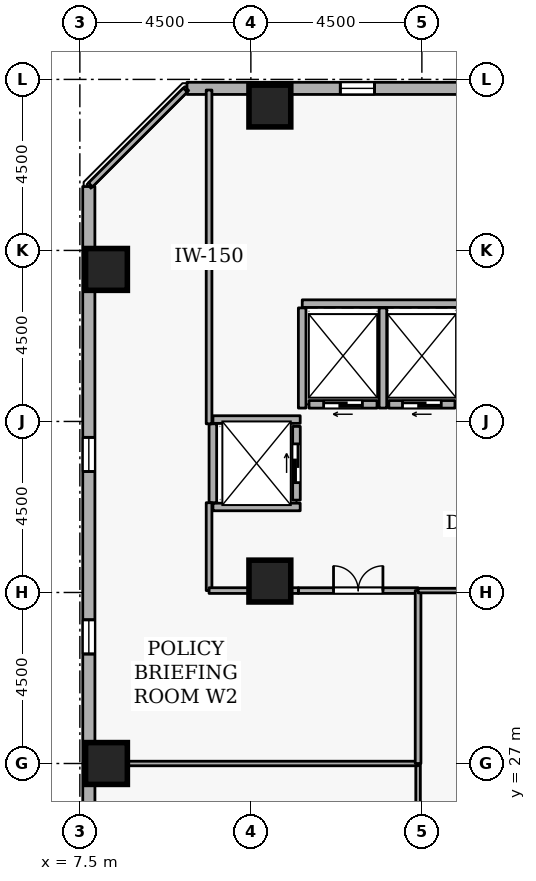
"""IFC4 building model, lengths in metres.
Left out: names, types, materials, properties, quantities, classifications, styles, units other than length and angle.
Written with IfcOpenShell. Run it as: python <this file> out.ifc"""

import sys

from ifc_helpers import new_model, si_unit, direction, frame, frame_2d, origin, origin_2d, place, context, subcontext, project, spatial, rectangle, extrude, element, fill, save


model = new_model("IFC4")
c1 = context("Model", 3, precision=1e-05, world=origin(), true_north=direction((0.0, 1.0)))
c2 = subcontext(c1, "Body", "Model", "MODEL_VIEW")
j1 = project(units=[si_unit("LENGTHUNIT", "METRE"), si_unit("PLANEANGLEUNIT", "RADIAN")], contexts=[c1])
p1 = place(None, origin())
s1 = spatial("IfcSite", under=j1, at=p1, CompositionType="ELEMENT")
p2 = place(p1, origin())
s2 = spatial("IfcBuilding", under=s1, at=p2, CompositionType="ELEMENT")
p3 = place(p2, frame((0.0, 0.0, 159.9)))
s3 = spatial("IfcBuildingStorey", under=s2, at=p3, CompositionType="ELEMENT", Elevation=159.9)
for number, where, z_axis, x_axis in (
    (1, (12.5, 44.3, 0.0), (0.0, 0.0, 1.0), (1.0, 0.0, 0.0)),
    (2, (8.2, 27.0, 0.0), (0.0, 0.0, 1.0), (1.0, 0.0, 0.0)),
    (3, (8.2, 40.0, 0.0), (0.0, 0.0, 1.0), (1.0, 0.0, 0.0)),
    (4, (12.5, 31.8, 0.0), (0.0, 0.0, 1.0), (1.0, 0.0, 0.0)),
):
    element("IfcColumn", number, at=place(p3, frame(where, z_axis=z_axis, x_axis=x_axis)), inside=s3, PredefinedType="COLUMN", context=c2, shape_type="SweptSolid", body=[
        extrude(rectangle(XDim=1.1, YDim=1.1, at=origin_2d()), origin(), (0.0, 0.0, 1.0), 3.6),
    ])
p4 = place(p3, frame((45.854, 44.762, 0.0), z_axis=(0.0, 0.0, 1.0), x_axis=(-0.999999997144, 7.5574884e-05, 0.0)))
e5 = element("IfcWall", 5, at=p4, inside=s3, PredefinedType="STANDARD", context=c2, shape_type="SweptSolid", body=[
    extrude(rectangle(XDim=35.535, YDim=0.32, at=frame_2d((17.768, 0.0))), origin(), (0.0, 0.0, 1.0), 2.7),
])
p5 = place(p4, frame((1.8, 0.0, 0.72)))
e6 = element("IfcOpeningElement", 6, at=p5, cuts=e5, PredefinedType="OPENING", context=c2, shape_type="SweptSolid", body=[
    extrude(rectangle(XDim=0.9, YDim=1.75, at=frame_2d((0.45, 0.875))), frame((0.0, 0.17, 0.0), z_axis=(0.0, -1.0, 0.0), x_axis=(1.0, 0.0, 0.0)), (0.0, 0.0, 1.0), 0.34),
])
p6 = place(p4, frame((11.4, 0.0, 0.72)))
e7 = element("IfcOpeningElement", 7, at=p6, cuts=e5, PredefinedType="OPENING", context=c2, shape_type="SweptSolid", body=[
    extrude(rectangle(XDim=0.9, YDim=1.75, at=frame_2d((0.45, 0.875))), frame((0.0, 0.17, 0.0), z_axis=(0.0, -1.0, 0.0), x_axis=(1.0, 0.0, 0.0)), (0.0, 0.0, 1.0), 0.34),
])
p7 = place(p4, frame((16.2, 0.0, 0.72)))
e8 = element("IfcOpeningElement", 8, at=p7, cuts=e5, PredefinedType="OPENING", context=c2, shape_type="SweptSolid", body=[
    extrude(rectangle(XDim=0.9, YDim=1.75, at=frame_2d((0.45, 0.875))), frame((0.0, 0.17, 0.0), z_axis=(0.0, -1.0, 0.0), x_axis=(1.0, 0.0, 0.0)), (0.0, 0.0, 1.0), 0.34),
])
p8 = place(p4, frame((25.8, 0.0, 0.72)))
e9 = element("IfcOpeningElement", 9, at=p8, cuts=e5, PredefinedType="OPENING", context=c2, shape_type="SweptSolid", body=[
    extrude(rectangle(XDim=0.9, YDim=1.75, at=frame_2d((0.45, 0.875))), frame((0.0, 0.17, 0.0), z_axis=(0.0, -1.0, 0.0), x_axis=(1.0, 0.0, 0.0)), (0.0, 0.0, 1.0), 0.34),
])
p9 = place(p4, frame((30.6, 0.0, 0.72)))
e10 = element("IfcOpeningElement", 10, at=p9, cuts=e5, PredefinedType="OPENING", context=c2, shape_type="SweptSolid", body=[
    extrude(rectangle(XDim=0.9, YDim=1.75, at=frame_2d((0.45, 0.875))), frame((0.0, 0.17, 0.0), z_axis=(0.0, -1.0, 0.0), x_axis=(1.0, 0.0, 0.0)), (0.0, 0.0, 1.0), 0.34),
])
p10 = place(p3, frame((7.735, 42.181, 0.0), z_axis=(0.0, 0.0, 1.0), x_axis=(7.5574884e-05, -0.999999997144, 0.0)))
e11 = element("IfcWall", 11, at=p10, inside=s3, PredefinedType="STANDARD", context=c2, shape_type="SweptSolid", body=[
    extrude(rectangle(XDim=35.535, YDim=0.32, at=frame_2d((17.768, 0.0))), origin(), (0.0, 0.0, 1.0), 2.7),
])
p11 = place(p10, frame((6.6, 0.0, 0.72)))
e12 = element("IfcOpeningElement", 12, at=p11, cuts=e11, PredefinedType="OPENING", context=c2, shape_type="SweptSolid", body=[
    extrude(rectangle(XDim=0.9, YDim=1.75, at=frame_2d((0.45, 0.875))), frame((0.0, 0.17, 0.0), z_axis=(0.0, -1.0, 0.0), x_axis=(1.0, 0.0, 0.0)), (0.0, 0.0, 1.0), 0.34),
])
p12 = place(p10, frame((11.4, 0.0, 0.72)))
e13 = element("IfcOpeningElement", 13, at=p12, cuts=e11, PredefinedType="OPENING", context=c2, shape_type="SweptSolid", body=[
    extrude(rectangle(XDim=0.9, YDim=1.75, at=frame_2d((0.45, 0.875))), frame((0.0, 0.17, 0.0), z_axis=(0.0, -1.0, 0.0), x_axis=(1.0, 0.0, 0.0)), (0.0, 0.0, 1.0), 0.34),
])
p13 = place(p10, frame((21.0, 0.0, 0.72)))
e14 = element("IfcOpeningElement", 14, at=p13, cuts=e11, PredefinedType="OPENING", context=c2, shape_type="SweptSolid", body=[
    extrude(rectangle(XDim=0.9, YDim=1.75, at=frame_2d((0.45, 0.875))), frame((0.0, 0.17, 0.0), z_axis=(0.0, -1.0, 0.0), x_axis=(1.0, 0.0, 0.0)), (0.0, 0.0, 1.0), 0.34),
])
p14 = place(p10, frame((25.8, 0.0, 0.72)))
e15 = element("IfcOpeningElement", 15, at=p14, cuts=e11, PredefinedType="OPENING", context=c2, shape_type="SweptSolid", body=[
    extrude(rectangle(XDim=0.9, YDim=1.75, at=frame_2d((0.45, 0.875))), frame((0.0, 0.17, 0.0), z_axis=(0.0, -1.0, 0.0), x_axis=(1.0, 0.0, 0.0)), (0.0, 0.0, 1.0), 0.34),
])
p15 = place(p10, frame((30.6, 0.0, 0.72)))
e16 = element("IfcOpeningElement", 16, at=p15, cuts=e11, PredefinedType="OPENING", context=c2, shape_type="SweptSolid", body=[
    extrude(rectangle(XDim=0.9, YDim=1.75, at=frame_2d((0.45, 0.875))), frame((0.0, 0.17, 0.0), z_axis=(0.0, -1.0, 0.0), x_axis=(1.0, 0.0, 0.0)), (0.0, 0.0, 1.0), 0.34),
])
p16 = place(p3, frame((17.37, 36.45, 0.0), z_axis=(0.0, 0.0, 1.0), x_axis=(-1.0, 0.0, 0.0)))
e17 = element("IfcWall", 17, at=p16, inside=s3, PredefinedType="STANDARD", context=c2, shape_type="SweptSolid", body=[
    extrude(rectangle(XDim=1.74, YDim=0.2, at=frame_2d((0.87, 0.0))), origin(), (0.0, 0.0, 1.0), 3.34),
])
p17 = place(p16, frame((0.36, 0.0, 0.0)))
e18 = element("IfcOpeningElement", 18, at=p17, cuts=e17, PredefinedType="OPENING", context=c2, shape_type="SweptSolid", body=[
    extrude(rectangle(XDim=1.02, YDim=2.06, at=frame_2d((0.51, 1.03))), frame((0.0, 0.11, 0.0), z_axis=(0.0, -1.0, 0.0), x_axis=(1.0, 0.0, 0.0)), (0.0, 0.0, 1.0), 0.22),
])
p18 = place(p3, frame((15.32, 36.45, 0.0), z_axis=(0.0, 0.0, 1.0), x_axis=(-1.0, 0.0, 0.0)))
e19 = element("IfcWall", 19, at=p18, inside=s3, PredefinedType="STANDARD", context=c2, shape_type="SweptSolid", body=[
    extrude(rectangle(XDim=1.79, YDim=0.2, at=frame_2d((0.895, 0.0))), origin(), (0.0, 0.0, 1.0), 3.34),
])
p19 = place(p18, frame((0.385, 0.0, 0.0)))
e20 = element("IfcOpeningElement", 20, at=p19, cuts=e19, PredefinedType="OPENING", context=c2, shape_type="SweptSolid", body=[
    extrude(rectangle(XDim=1.02, YDim=2.06, at=frame_2d((0.51, 1.03))), frame((0.0, 0.11, 0.0), z_axis=(0.0, -1.0, 0.0), x_axis=(1.0, 0.0, 0.0)), (0.0, 0.0, 1.0), 0.22),
])
p20 = place(p3, frame((13.2, 33.93, 0.0), z_axis=(0.0, 0.0, 1.0), x_axis=(0.0, 1.0, 0.0)))
e21 = element("IfcWall", 21, at=p20, inside=s3, PredefinedType="STANDARD", context=c2, shape_type="SweptSolid", body=[
    extrude(rectangle(XDim=1.94, YDim=0.2, at=frame_2d((0.97, 0.0))), origin(), (0.0, 0.0, 1.0), 3.34),
])
p21 = place(p20, frame((0.46, 0.0, 0.0)))
e22 = element("IfcOpeningElement", 22, at=p21, cuts=e21, PredefinedType="OPENING", context=c2, shape_type="SweptSolid", body=[
    extrude(rectangle(XDim=1.02, YDim=2.06, at=frame_2d((0.51, 1.03))), frame((0.0, 0.11, 0.0), z_axis=(0.0, -1.0, 0.0), x_axis=(1.0, 0.0, 0.0)), (0.0, 0.0, 1.0), 0.22),
])
p22 = place(p3, frame((13.352, 39.1, 0.0), z_axis=(0.0, 0.0, 1.0), x_axis=(1.0, 0.0, 0.0)))
e23 = element("IfcWall", 23, at=p22, inside=s3, PredefinedType="STANDARD", context=c2, shape_type="SweptSolid", body=[
    extrude(rectangle(XDim=4.196, YDim=0.2, at=frame_2d((2.098, 0.0))), origin(), (0.0, 0.0, 1.0), 3.34),
])
for number, where, z_axis, x_axis in (
    (24, (15.475, 36.352, 0.0), (0.0, 0.0, 1.0), (0.0, 1.0, 0.0)),
    (25, (13.35, 36.352, 0.0), (0.0, 0.0, 1.0), (0.0, 1.0, 0.0)),
):
    element("IfcWall", number, at=place(p3, frame(where, z_axis=z_axis, x_axis=x_axis)), inside=s3, PredefinedType="STANDARD", context=c2, shape_type="SweptSolid", body=[
        extrude(rectangle(XDim=2.636, YDim=0.2, at=frame_2d((1.318, 0.0))), origin(), (0.0, 0.0, 1.0), 3.34),
    ])
for number, where, z_axis, x_axis in (
    (26, (11.002, 36.05, 0.0), (0.0, 0.0, 1.0), (1.0, 0.0, 0.0)),
    (27, (11.002, 33.75, 0.0), (0.0, 0.0, 1.0), (1.0, 0.0, 0.0)),
):
    element("IfcWall", number, at=place(p3, frame(where, z_axis=z_axis, x_axis=x_axis)), inside=s3, PredefinedType="STANDARD", context=c2, shape_type="SweptSolid", body=[
        extrude(rectangle(XDim=2.296, YDim=0.2, at=frame_2d((1.148, 0.0))), origin(), (0.0, 0.0, 1.0), 3.34),
    ])
p23 = place(p3, frame((11.0, 33.862, 0.0), z_axis=(0.0, 0.0, 1.0), x_axis=(0.0, 1.0, 0.0)))
e28 = element("IfcWall", 28, at=p23, inside=s3, PredefinedType="STANDARD", context=c2, shape_type="SweptSolid", body=[
    extrude(rectangle(XDim=2.076, YDim=0.2, at=frame_2d((1.038, 0.0))), origin(), (0.0, 0.0, 1.0), 3.34),
])
p24 = place(p3, frame((16.4, 27.0, 0.0), z_axis=(0.0, 0.0, 1.0), x_axis=(0.0, -1.0, 0.0)))
e29 = element("IfcWall", 29, at=p24, inside=s3, PredefinedType="PARTITIONING", context=c2, shape_type="SweptSolid", body=[
    extrude(rectangle(XDim=4.55, YDim=0.12, at=frame_2d((2.275, 0.0))), origin(), (0.0, 0.0, 1.0), 3.34),
])
p25 = place(p3, frame((7.78, 27.0, 0.0), z_axis=(0.0, 0.0, 1.0), x_axis=(1.0, 0.0, 0.0)))
e30 = element("IfcWall", 30, at=p25, inside=s3, PredefinedType="PARTITIONING", context=c2, shape_type="SweptSolid", body=[
    extrude(rectangle(XDim=8.62, YDim=0.12, at=frame_2d((4.31, 0.0))), origin(), (0.0, 0.0, 1.0), 2.878),
])
p26 = place(p3, frame((13.25, 31.55, 0.0), z_axis=(0.0, 0.0, 1.0), x_axis=(1.0, 0.0, 0.0)))
e31 = element("IfcWall", 31, at=p26, inside=s3, PredefinedType="PARTITIONING", context=c2, shape_type="SweptSolid", body=[
    extrude(rectangle(XDim=3.15, YDim=0.15, at=frame_2d((1.575, 0.0))), origin(), (0.0, 0.0, 1.0), 3.34),
])
p27 = place(p26, frame((0.925, 0.0, 0.0)))
e32 = element("IfcOpeningElement", 32, at=p27, cuts=e31, PredefinedType="OPENING", context=c2, shape_type="SweptSolid", body=[
    extrude(rectangle(XDim=1.3, YDim=2.12, at=frame_2d((0.65, 1.06))), frame((0.0, 0.085, 0.0), z_axis=(0.0, -1.0, 0.0), x_axis=(1.0, 0.0, 0.0)), (0.0, 0.0, 1.0), 0.17),
])
p28 = place(p3, frame((16.4, 31.55, 0.0), z_axis=(0.0, 0.0, 1.0), x_axis=(0.0, -1.0, 0.0)))
e33 = element("IfcWall", 33, at=p28, inside=s3, PredefinedType="PARTITIONING", context=c2, shape_type="SweptSolid", body=[
    extrude(rectangle(XDim=4.55, YDim=0.15, at=frame_2d((2.275, 0.0))), origin(), (0.0, 0.0, 1.0), 3.34),
])
p29 = place(p3, frame((7.78, 42.225, 0.0), z_axis=(0.0, 0.0, 1.0), x_axis=(0.707106781187, 0.707106781187, 0.0)))
e34 = element("IfcWall", 34, at=p29, inside=s3, PredefinedType="PARTITIONING", context=c2, shape_type="SweptSolid", body=[
    extrude(rectangle(XDim=3.528, YDim=0.15, at=frame_2d((1.764, 0.0))), origin(), (0.0, 0.0, 1.0), 3.34),
])
p30 = place(p3, frame((10.9, 44.72, 0.0), z_axis=(0.0, 0.0, 1.0), x_axis=(0.0, -1.0, 0.0)))
e35 = element("IfcWall", 35, at=p30, inside=s3, PredefinedType="PARTITIONING", context=c2, shape_type="SweptSolid", body=[
    extrude(rectangle(XDim=8.782, YDim=0.15, at=frame_2d((4.391, 0.0))), origin(), (0.0, 0.0, 1.0), 3.34),
])
p31 = place(p3, frame((10.9, 33.862, 0.0), z_axis=(0.0, 0.0, 1.0), x_axis=(0.0, -1.0, 0.0)))
e36 = element("IfcWall", 36, at=p31, inside=s3, PredefinedType="PARTITIONING", context=c2, shape_type="SweptSolid", body=[
    extrude(rectangle(XDim=2.312, YDim=0.15, at=frame_2d((1.156, 0.0))), origin(), (0.0, 0.0, 1.0), 3.34),
])
p32 = place(p3, frame((10.9, 31.55, 0.0), z_axis=(0.0, 0.0, 1.0), x_axis=(1.0, 0.0, 0.0)))
e37 = element("IfcWall", 37, at=p32, inside=s3, PredefinedType="PARTITIONING", context=c2, shape_type="SweptSolid", body=[
    extrude(rectangle(XDim=2.35, YDim=0.15, at=frame_2d((1.175, 0.0))), origin(), (0.0, 0.0, 1.0), 3.34),
])
p33 = place(p3, frame((16.4, 31.55, 0.0), z_axis=(0.0, 0.0, 1.0), x_axis=(1.0, 0.0, 0.0)))
e38 = element("IfcWall", 38, at=p33, inside=s3, PredefinedType="PARTITIONING", context=c2, shape_type="SweptSolid", body=[
    extrude(rectangle(XDim=4.5, YDim=0.12, at=frame_2d((2.25, 0.0))), origin(), (0.0, 0.0, 1.0), 3.34),
])
p34 = place(p33, frame((1.775, 0.0, 0.0)))
e39 = element("IfcOpeningElement", 39, at=p34, cuts=e38, PredefinedType="OPENING", context=c2, shape_type="SweptSolid", body=[
    extrude(rectangle(XDim=0.95, YDim=2.1, at=frame_2d((0.475, 1.05))), frame((0.0, 0.07, 0.0), z_axis=(0.0, -1.0, 0.0), x_axis=(1.0, 0.0, 0.0)), (0.0, 0.0, 1.0), 0.14),
])
p35 = place(p9, origin())
e40 = element("IfcWindow", 40, at=p35, inside=s3, PartitioningType="SINGLE_PANEL", PredefinedType="WINDOW", context=c2, shape_type="SweptSolid", body=[
    extrude(rectangle(XDim=0.9, YDim=1.75, at=frame_2d((0.45, 0.875))), frame((0.0, 0.03, 0.0), z_axis=(0.0, -1.0, 0.0), x_axis=(1.0, 0.0, 0.0)), (0.0, 0.0, 1.0), 0.06),
])
fill(e10, e40)
p36 = place(p11, origin())
e41 = element("IfcWindow", 41, at=p36, inside=s3, PartitioningType="SINGLE_PANEL", PredefinedType="WINDOW", context=c2, shape_type="SweptSolid", body=[
    extrude(rectangle(XDim=0.9, YDim=1.75, at=frame_2d((0.45, 0.875))), frame((0.0, 0.03, 0.0), z_axis=(0.0, -1.0, 0.0), x_axis=(1.0, 0.0, 0.0)), (0.0, 0.0, 1.0), 0.06),
])
fill(e12, e41)
p37 = place(p12, origin())
e42 = element("IfcWindow", 42, at=p37, inside=s3, PartitioningType="SINGLE_PANEL", PredefinedType="WINDOW", context=c2, shape_type="SweptSolid", body=[
    extrude(rectangle(XDim=0.9, YDim=1.75, at=frame_2d((0.45, 0.875))), frame((0.0, 0.03, 0.0), z_axis=(0.0, -1.0, 0.0), x_axis=(1.0, 0.0, 0.0)), (0.0, 0.0, 1.0), 0.06),
])
fill(e13, e42)
p38 = place(p17, origin())
e43 = element("IfcDoor", 43, at=p38, inside=s3, OperationType="SLIDING_TO_LEFT", PredefinedType="DOOR", context=c2, shape_type="SweptSolid", body=[
    extrude(rectangle(XDim=1.02, YDim=2.06, at=frame_2d((0.51, 1.03))), frame((0.0, 0.025, 0.0), z_axis=(0.0, -1.0, 0.0), x_axis=(1.0, 0.0, 0.0)), (0.0, 0.0, 1.0), 0.05),
])
fill(e18, e43)
p39 = place(p19, origin())
e44 = element("IfcDoor", 44, at=p39, inside=s3, OperationType="SLIDING_TO_LEFT", PredefinedType="DOOR", context=c2, shape_type="SweptSolid", body=[
    extrude(rectangle(XDim=1.02, YDim=2.06, at=frame_2d((0.51, 1.03))), frame((0.0, 0.025, 0.0), z_axis=(0.0, -1.0, 0.0), x_axis=(1.0, 0.0, 0.0)), (0.0, 0.0, 1.0), 0.05),
])
fill(e20, e44)
p40 = place(p21, origin())
e45 = element("IfcDoor", 45, at=p40, inside=s3, OperationType="SLIDING_TO_LEFT", PredefinedType="DOOR", context=c2, shape_type="SweptSolid", body=[
    extrude(rectangle(XDim=1.02, YDim=2.06, at=frame_2d((0.51, 1.03))), frame((0.0, 0.025, 0.0), z_axis=(0.0, -1.0, 0.0), x_axis=(1.0, 0.0, 0.0)), (0.0, 0.0, 1.0), 0.05),
])
fill(e22, e45)
p41 = place(p27, origin())
e46 = element("IfcDoor", 46, at=p41, inside=s3, OperationType="DOUBLE_DOOR_SINGLE_SWING", PredefinedType="DOOR", context=c2, shape_type="SweptSolid", body=[
    extrude(rectangle(XDim=1.3, YDim=2.12, at=frame_2d((0.65, 1.06))), frame((0.0, 0.025, 0.0), z_axis=(0.0, -1.0, 0.0), x_axis=(1.0, 0.0, 0.0)), (0.0, 0.0, 1.0), 0.05),
])
fill(e32, e46)
save(model, sys.argv[1])
